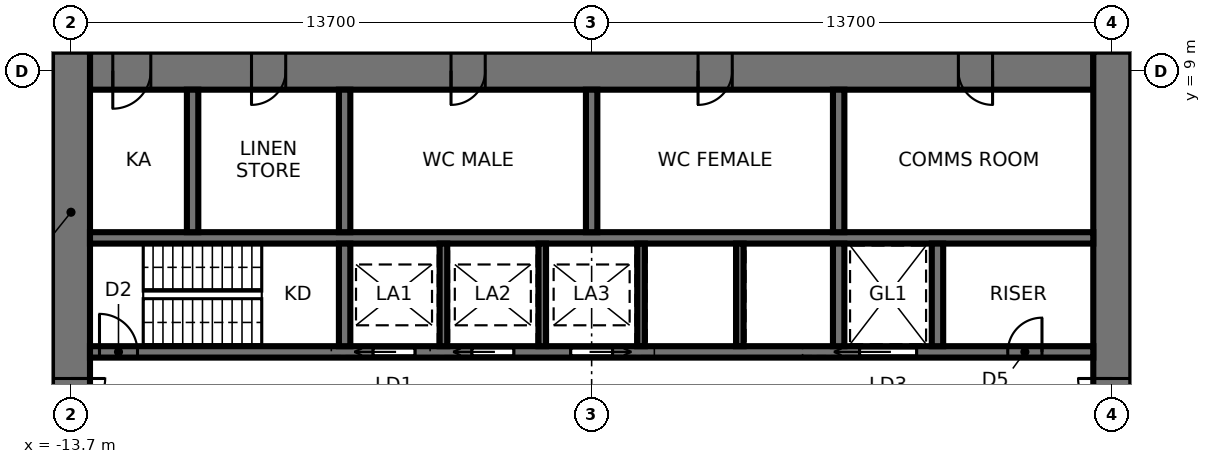
"""IFC4 building model, lengths in metres.
Left out: names, types, materials, properties, quantities, classifications, styles, units other than length and angle.
Written with IfcOpenShell. Run it as: python <this file> out.ifc"""

import sys

from ifc_helpers import new_model, si_unit, direction, frame, frame_2d, origin, place, context, subcontext, project, spatial, rectangle, extrude, element, fill, save


model = new_model("IFC4")
c1 = context("Model", 3, precision=1e-05, world=origin(), true_north=direction((0.0, 1.0)))
c2 = subcontext(c1, "Body", "Model", "MODEL_VIEW")
j1 = project(units=[si_unit("LENGTHUNIT", "METRE"), si_unit("PLANEANGLEUNIT", "RADIAN")], contexts=[c1])
p1 = place(None, origin())
s1 = spatial("IfcSite", under=j1, at=p1, CompositionType="ELEMENT")
p2 = place(p1, origin())
s2 = spatial("IfcBuilding", under=s1, at=p2, CompositionType="ELEMENT")
p3 = place(p2, frame((0.0, 0.0, 15.1)))
s3 = spatial("IfcBuildingStorey", under=s2, at=p3, CompositionType="ELEMENT", Elevation=15.1)
p4 = place(p3, frame((13.2, 9.0, 0.0), z_axis=(0.0, 0.0, 1.0), x_axis=(-1.0, 0.0, 0.0)))
e1 = element("IfcWall", 1, at=p4, inside=s3, PredefinedType="SHEAR", context=c2, shape_type="SweptSolid", body=[
    extrude(rectangle(XDim=26.4, YDim=1.0, at=frame_2d((13.2, 0.0))), origin(), (0.0, 0.0, 1.0), 4.5),
])
p5 = place(p4, frame((2.65, 0.0, 0.0)))
e2 = element("IfcOpeningElement", 2, at=p5, cuts=e1, PredefinedType="OPENING", context=c2, shape_type="SweptSolid", body=[
    extrude(rectangle(XDim=0.9, YDim=2.1, at=frame_2d((0.45, 1.05))), frame((0.0, 0.51, 0.0), z_axis=(0.0, -1.0, 0.0), x_axis=(1.0, 0.0, 0.0)), (0.0, 0.0, 1.0), 1.02),
])
p6 = place(p4, frame((9.5, 0.0, 0.0)))
e3 = element("IfcOpeningElement", 3, at=p6, cuts=e1, PredefinedType="OPENING", context=c2, shape_type="SweptSolid", body=[
    extrude(rectangle(XDim=0.9, YDim=2.1, at=frame_2d((0.45, 1.05))), frame((0.0, 0.51, 0.0), z_axis=(0.0, -1.0, 0.0), x_axis=(1.0, 0.0, 0.0)), (0.0, 0.0, 1.0), 1.02),
])
p7 = place(p4, frame((16.0, 0.0, 0.0)))
e4 = element("IfcOpeningElement", 4, at=p7, cuts=e1, PredefinedType="OPENING", context=c2, shape_type="SweptSolid", body=[
    extrude(rectangle(XDim=0.9, YDim=2.1, at=frame_2d((0.45, 1.05))), frame((0.0, 0.51, 0.0), z_axis=(0.0, -1.0, 0.0), x_axis=(1.0, 0.0, 0.0)), (0.0, 0.0, 1.0), 1.02),
])
p8 = place(p4, frame((21.25, 0.0, 0.0)))
e5 = element("IfcOpeningElement", 5, at=p8, cuts=e1, PredefinedType="OPENING", context=c2, shape_type="SweptSolid", body=[
    extrude(rectangle(XDim=0.9, YDim=2.1, at=frame_2d((0.45, 1.05))), frame((0.0, 0.51, 0.0), z_axis=(0.0, -1.0, 0.0), x_axis=(1.0, 0.0, 0.0)), (0.0, 0.0, 1.0), 1.02),
])
p9 = place(p4, frame((24.8, 0.0, 0.0)))
e6 = element("IfcOpeningElement", 6, at=p9, cuts=e1, PredefinedType="OPENING", context=c2, shape_type="SweptSolid", body=[
    extrude(rectangle(XDim=1.0, YDim=2.1, at=frame_2d((0.5, 1.05))), frame((0.0, 0.51, 0.0), z_axis=(0.0, -1.0, 0.0), x_axis=(1.0, 0.0, 0.0)), (0.0, 0.0, 1.0), 1.02),
])
p10 = place(p3, frame((13.7, -9.5, 0.0), z_axis=(0.0, 0.0, 1.0), x_axis=(0.0, 1.0, 0.0)))
e7 = element("IfcWall", 7, at=p10, inside=s3, PredefinedType="SHEAR", context=c2, shape_type="SweptSolid", body=[
    extrude(rectangle(XDim=19.0, YDim=1.0, at=frame_2d((9.5, 0.0))), origin(), (0.0, 0.0, 1.0), 4.5),
])
p11 = place(p10, frame((8.6, 0.0, 0.0)))
e8 = element("IfcOpeningElement", 8, at=p11, cuts=e7, PredefinedType="OPENING", context=c2, shape_type="SweptSolid", body=[
    extrude(rectangle(XDim=1.8, YDim=2.4, at=frame_2d((0.9, 1.2))), frame((0.0, 0.51, 0.0), z_axis=(0.0, -1.0, 0.0), x_axis=(1.0, 0.0, 0.0)), (0.0, 0.0, 1.0), 1.02),
])
p12 = place(p3, frame((-13.7, 9.5, 0.0), z_axis=(0.0, 0.0, 1.0), x_axis=(0.0, -1.0, 0.0)))
e9 = element("IfcWall", 9, at=p12, inside=s3, PredefinedType="SHEAR", context=c2, shape_type="SweptSolid", body=[
    extrude(rectangle(XDim=19.0, YDim=1.0, at=frame_2d((9.5, 0.0))), origin(), (0.0, 0.0, 1.0), 4.5),
])
p13 = place(p12, frame((8.6, 0.0, 0.0)))
e10 = element("IfcOpeningElement", 10, at=p13, cuts=e9, PredefinedType="OPENING", context=c2, shape_type="SweptSolid", body=[
    extrude(rectangle(XDim=1.8, YDim=2.4, at=frame_2d((0.9, 1.2))), frame((0.0, 0.51, 0.0), z_axis=(0.0, -1.0, 0.0), x_axis=(1.0, 0.0, 0.0)), (0.0, 0.0, 1.0), 1.02),
])
p14 = place(p3, frame((-13.2, 1.6, 0.0), z_axis=(0.0, 0.0, 1.0), x_axis=(1.0, 0.0, 0.0)))
e11 = element("IfcWall", 11, at=p14, inside=s3, PredefinedType="SHEAR", context=c2, shape_type="SweptSolid", body=[
    extrude(rectangle(XDim=26.4, YDim=0.3, at=frame_2d((13.2, 0.0))), origin(), (0.0, 0.0, 1.0), 4.5),
])
p15 = place(p14, frame((0.25, 0.0, 0.0)))
e12 = element("IfcOpeningElement", 12, at=p15, cuts=e11, PredefinedType="OPENING", context=c2, shape_type="SweptSolid", body=[
    extrude(rectangle(XDim=1.0, YDim=2.1, at=frame_2d((0.5, 1.05))), frame((0.0, 0.16, 0.0), z_axis=(0.0, -1.0, 0.0), x_axis=(1.0, 0.0, 0.0)), (0.0, 0.0, 1.0), 0.32),
])
p16 = place(p14, frame((20.25, 0.0, 0.0)))
e13 = element("IfcOpeningElement", 13, at=p16, cuts=e11, PredefinedType="OPENING", context=c2, shape_type="SweptSolid", body=[
    extrude(rectangle(XDim=1.5, YDim=2.4, at=frame_2d((0.75, 1.2))), frame((0.0, 0.16, 0.0), z_axis=(0.0, -1.0, 0.0), x_axis=(1.0, 0.0, 0.0)), (0.0, 0.0, 1.0), 0.32),
])
p17 = place(p14, frame((7.45, 0.0, 0.0)))
e14 = element("IfcOpeningElement", 14, at=p17, cuts=e11, PredefinedType="OPENING", context=c2, shape_type="SweptSolid", body=[
    extrude(rectangle(XDim=1.1, YDim=2.3, at=frame_2d((0.55, 1.15))), frame((0.0, 0.16, 0.0), z_axis=(0.0, -1.0, 0.0), x_axis=(1.0, 0.0, 0.0)), (0.0, 0.0, 1.0), 0.32),
])
p18 = place(p14, frame((10.05, 0.0, 0.0)))
e15 = element("IfcOpeningElement", 15, at=p18, cuts=e11, PredefinedType="OPENING", context=c2, shape_type="SweptSolid", body=[
    extrude(rectangle(XDim=1.1, YDim=2.3, at=frame_2d((0.55, 1.15))), frame((0.0, 0.16, 0.0), z_axis=(0.0, -1.0, 0.0), x_axis=(1.0, 0.0, 0.0)), (0.0, 0.0, 1.0), 0.32),
])
p19 = place(p14, frame((12.65, 0.0, 0.0)))
e16 = element("IfcOpeningElement", 16, at=p19, cuts=e11, PredefinedType="OPENING", context=c2, shape_type="SweptSolid", body=[
    extrude(rectangle(XDim=1.1, YDim=2.3, at=frame_2d((0.55, 1.15))), frame((0.0, 0.16, 0.0), z_axis=(0.0, -1.0, 0.0), x_axis=(1.0, 0.0, 0.0)), (0.0, 0.0, 1.0), 0.32),
])
p20 = place(p14, frame((24.15, 0.0, 0.0)))
e17 = element("IfcOpeningElement", 17, at=p20, cuts=e11, PredefinedType="OPENING", context=c2, shape_type="SweptSolid", body=[
    extrude(rectangle(XDim=0.9, YDim=2.1, at=frame_2d((0.45, 1.05))), frame((0.0, 0.16, 0.0), z_axis=(0.0, -1.0, 0.0), x_axis=(1.0, 0.0, 0.0)), (0.0, 0.0, 1.0), 0.32),
])
p21 = place(p3, frame((-13.2, 4.6, 0.0), z_axis=(0.0, 0.0, 1.0), x_axis=(1.0, 0.0, 0.0)))
e18 = element("IfcWall", 18, at=p21, inside=s3, PredefinedType="SHEAR", context=c2, shape_type="SweptSolid", body=[
    extrude(rectangle(XDim=26.4, YDim=0.3, at=frame_2d((13.2, 0.0))), origin(), (0.0, 0.0, 1.0), 4.5),
])
p22 = place(p3, frame((-6.5, 1.75, 0.0), z_axis=(0.0, 0.0, 1.0), x_axis=(0.0, 1.0, 0.0)))
e19 = element("IfcWall", 19, at=p22, inside=s3, PredefinedType="SHEAR", context=c2, shape_type="SweptSolid", body=[
    extrude(rectangle(XDim=2.7, YDim=0.3, at=frame_2d((1.35, 0.0))), origin(), (0.0, 0.0, 1.0), 4.5),
])
p23 = place(p3, frame((-6.5, 4.75, 0.0), z_axis=(0.0, 0.0, 1.0), x_axis=(0.0, 1.0, 0.0)))
e20 = element("IfcWall", 20, at=p23, inside=s3, PredefinedType="SHEAR", context=c2, shape_type="SweptSolid", body=[
    extrude(rectangle(XDim=3.75, YDim=0.3, at=frame_2d((1.875, 0.0))), origin(), (0.0, 0.0, 1.0), 4.5),
])
p24 = place(p3, frame((6.5, 1.75, 0.0), z_axis=(0.0, 0.0, 1.0), x_axis=(0.0, 1.0, 0.0)))
e21 = element("IfcWall", 21, at=p24, inside=s3, PredefinedType="SHEAR", context=c2, shape_type="SweptSolid", body=[
    extrude(rectangle(XDim=2.7, YDim=0.3, at=frame_2d((1.35, 0.0))), origin(), (0.0, 0.0, 1.0), 4.5),
])
p25 = place(p3, frame((6.5, 4.75, 0.0), z_axis=(0.0, 0.0, 1.0), x_axis=(0.0, 1.0, 0.0)))
e22 = element("IfcWall", 22, at=p25, inside=s3, PredefinedType="SHEAR", context=c2, shape_type="SweptSolid", body=[
    extrude(rectangle(XDim=3.75, YDim=0.3, at=frame_2d((1.875, 0.0))), origin(), (0.0, 0.0, 1.0), 4.5),
])
for number, where, z_axis, x_axis in (
    (23, (-3.9, 1.75, 0.0), (0.0, 0.0, 1.0), (0.0, 1.0, 0.0)),
    (24, (-1.3, 1.75, 0.0), (0.0, 0.0, 1.0), (0.0, 1.0, 0.0)),
    (25, (1.3, 1.75, 0.0), (0.0, 0.0, 1.0), (0.0, 1.0, 0.0)),
    (26, (3.9, 1.75, 0.0), (0.0, 0.0, 1.0), (0.0, 1.0, 0.0)),
):
    element("IfcWall", number, at=place(p3, frame(where, z_axis=z_axis, x_axis=x_axis)), inside=s3, PredefinedType="SHEAR", context=c2, shape_type="SweptSolid", body=[
        extrude(rectangle(XDim=2.7, YDim=0.2, at=frame_2d((1.35, 0.0))), origin(), (0.0, 0.0, 1.0), 4.5),
    ])
for number, where, z_axis, x_axis in (
    (27, (0.0, 4.75, 0.0), (0.0, 0.0, 1.0), (0.0, 1.0, 0.0)),
    (28, (-10.5, 4.75, 0.0), (0.0, 0.0, 1.0), (0.0, 1.0, 0.0)),
):
    element("IfcWall", number, at=place(p3, frame(where, z_axis=z_axis, x_axis=x_axis)), inside=s3, PredefinedType="SHEAR", context=c2, shape_type="SweptSolid", body=[
        extrude(rectangle(XDim=3.75, YDim=0.3, at=frame_2d((1.875, 0.0))), origin(), (0.0, 0.0, 1.0), 4.5),
    ])
p26 = place(p3, frame((9.1, 1.75, 0.0), z_axis=(0.0, 0.0, 1.0), x_axis=(0.0, 1.0, 0.0)))
e29 = element("IfcWall", 29, at=p26, inside=s3, PredefinedType="SHEAR", context=c2, shape_type="SweptSolid", body=[
    extrude(rectangle(XDim=2.7, YDim=0.3, at=frame_2d((1.35, 0.0))), origin(), (0.0, 0.0, 1.0), 4.5),
])
p27 = place(p13, origin())
e30 = element("IfcDoor", 30, at=p27, inside=s3, OperationType="DOUBLE_DOOR_SINGLE_SWING", PredefinedType="DOOR", context=c2, shape_type="SweptSolid", body=[
    extrude(rectangle(XDim=1.72, YDim=2.36, at=frame_2d((0.9, 1.18))), frame((0.0, 0.025, 0.0), z_axis=(0.0, -1.0, 0.0), x_axis=(1.0, 0.0, 0.0)), (0.0, 0.0, 1.0), 0.05),
    extrude(rectangle(XDim=0.04, YDim=2.4, at=frame_2d((0.02, 1.2))), frame((0.0, 0.25, 0.0), z_axis=(0.0, -1.0, 0.0), x_axis=(1.0, 0.0, 0.0)), (0.0, 0.0, 1.0), 0.5),
    extrude(rectangle(XDim=0.04, YDim=2.4, at=frame_2d((1.78, 1.2))), frame((0.0, 0.25, 0.0), z_axis=(0.0, -1.0, 0.0), x_axis=(1.0, 0.0, 0.0)), (0.0, 0.0, 1.0), 0.5),
    extrude(rectangle(XDim=1.72, YDim=0.04, at=frame_2d((0.9, 2.38))), frame((0.0, 0.25, 0.0), z_axis=(0.0, -1.0, 0.0), x_axis=(1.0, 0.0, 0.0)), (0.0, 0.0, 1.0), 0.5),
])
fill(e10, e30)
p28 = place(p11, origin())
e31 = element("IfcDoor", 31, at=p28, inside=s3, OperationType="DOUBLE_DOOR_SINGLE_SWING", PredefinedType="DOOR", context=c2, shape_type="SweptSolid", body=[
    extrude(rectangle(XDim=1.72, YDim=2.36, at=frame_2d((0.9, 1.18))), frame((0.0, 0.025, 0.0), z_axis=(0.0, -1.0, 0.0), x_axis=(1.0, 0.0, 0.0)), (0.0, 0.0, 1.0), 0.05),
    extrude(rectangle(XDim=0.04, YDim=2.4, at=frame_2d((0.02, 1.2))), frame((0.0, 0.25, 0.0), z_axis=(0.0, -1.0, 0.0), x_axis=(1.0, 0.0, 0.0)), (0.0, 0.0, 1.0), 0.5),
    extrude(rectangle(XDim=0.04, YDim=2.4, at=frame_2d((1.78, 1.2))), frame((0.0, 0.25, 0.0), z_axis=(0.0, -1.0, 0.0), x_axis=(1.0, 0.0, 0.0)), (0.0, 0.0, 1.0), 0.5),
    extrude(rectangle(XDim=1.72, YDim=0.04, at=frame_2d((0.9, 2.38))), frame((0.0, 0.25, 0.0), z_axis=(0.0, -1.0, 0.0), x_axis=(1.0, 0.0, 0.0)), (0.0, 0.0, 1.0), 0.5),
])
fill(e8, e31)
p29 = place(p15, origin())
e32 = element("IfcDoor", 32, at=p29, inside=s3, OperationType="SINGLE_SWING_LEFT", PredefinedType="DOOR", context=c2, shape_type="SweptSolid", body=[
    extrude(rectangle(XDim=1.0, YDim=2.1, at=frame_2d((0.5, 1.05))), frame((0.0, 0.025, 0.0), z_axis=(0.0, -1.0, 0.0), x_axis=(1.0, 0.0, 0.0)), (0.0, 0.0, 1.0), 0.05),
])
fill(e12, e32)
p30 = place(p16, origin())
e33 = element("IfcDoor", 33, at=p30, inside=s3, OperationType="SLIDING_TO_LEFT", PredefinedType="DOOR", context=c2, shape_type="SweptSolid", body=[
    extrude(rectangle(XDim=1.5, YDim=2.4, at=frame_2d((0.75, 1.2))), frame((0.0, 0.025, 0.0), z_axis=(0.0, -1.0, 0.0), x_axis=(1.0, 0.0, 0.0)), (0.0, 0.0, 1.0), 0.05),
])
fill(e13, e33)
p31 = place(p17, origin())
e34 = element("IfcDoor", 34, at=p31, inside=s3, OperationType="SLIDING_TO_LEFT", PredefinedType="DOOR", context=c2, shape_type="SweptSolid", body=[
    extrude(rectangle(XDim=1.1, YDim=2.3, at=frame_2d((0.55, 1.15))), frame((0.0, 0.025, 0.0), z_axis=(0.0, -1.0, 0.0), x_axis=(1.0, 0.0, 0.0)), (0.0, 0.0, 1.0), 0.05),
])
fill(e14, e34)
p32 = place(p18, origin())
e35 = element("IfcDoor", 35, at=p32, inside=s3, OperationType="SLIDING_TO_LEFT", PredefinedType="DOOR", context=c2, shape_type="SweptSolid", body=[
    extrude(rectangle(XDim=1.1, YDim=2.3, at=frame_2d((0.55, 1.15))), frame((0.0, 0.025, 0.0), z_axis=(0.0, -1.0, 0.0), x_axis=(1.0, 0.0, 0.0)), (0.0, 0.0, 1.0), 0.05),
])
fill(e15, e35)
p33 = place(p19, origin())
e36 = element("IfcDoor", 36, at=p33, inside=s3, OperationType="SLIDING_TO_RIGHT", PredefinedType="DOOR", context=c2, shape_type="SweptSolid", body=[
    extrude(rectangle(XDim=1.1, YDim=2.3, at=frame_2d((0.55, 1.15))), frame((0.0, 0.025, 0.0), z_axis=(0.0, -1.0, 0.0), x_axis=(1.0, 0.0, 0.0)), (0.0, 0.0, 1.0), 0.05),
])
fill(e16, e36)
p34 = place(p20, origin())
e37 = element("IfcDoor", 37, at=p34, inside=s3, OperationType="SINGLE_SWING_RIGHT", PredefinedType="DOOR", context=c2, shape_type="SweptSolid", body=[
    extrude(rectangle(XDim=0.9, YDim=2.1, at=frame_2d((0.45, 1.05))), frame((0.0, 0.025, 0.0), z_axis=(0.0, -1.0, 0.0), x_axis=(1.0, 0.0, 0.0)), (0.0, 0.0, 1.0), 0.05),
])
fill(e17, e37)
p35 = place(p5, origin())
e38 = element("IfcDoor", 38, at=p35, inside=s3, OperationType="SINGLE_SWING_LEFT", PredefinedType="DOOR", context=c2, shape_type="SweptSolid", body=[
    extrude(rectangle(XDim=0.82, YDim=2.06, at=frame_2d((0.45, 1.03))), frame((0.0, 0.025, 0.0), z_axis=(0.0, -1.0, 0.0), x_axis=(1.0, 0.0, 0.0)), (0.0, 0.0, 1.0), 0.05),
    extrude(rectangle(XDim=0.04, YDim=2.1, at=frame_2d((0.02, 1.05))), frame((0.0, 0.25, 0.0), z_axis=(0.0, -1.0, 0.0), x_axis=(1.0, 0.0, 0.0)), (0.0, 0.0, 1.0), 0.5),
    extrude(rectangle(XDim=0.04, YDim=2.1, at=frame_2d((0.88, 1.05))), frame((0.0, 0.25, 0.0), z_axis=(0.0, -1.0, 0.0), x_axis=(1.0, 0.0, 0.0)), (0.0, 0.0, 1.0), 0.5),
    extrude(rectangle(XDim=0.82, YDim=0.04, at=frame_2d((0.45, 2.08))), frame((0.0, 0.25, 0.0), z_axis=(0.0, -1.0, 0.0), x_axis=(1.0, 0.0, 0.0)), (0.0, 0.0, 1.0), 0.5),
])
fill(e2, e38)
p36 = place(p6, origin())
e39 = element("IfcDoor", 39, at=p36, inside=s3, OperationType="SINGLE_SWING_RIGHT", PredefinedType="DOOR", context=c2, shape_type="SweptSolid", body=[
    extrude(rectangle(XDim=0.82, YDim=2.06, at=frame_2d((0.45, 1.03))), frame((0.0, 0.025, 0.0), z_axis=(0.0, -1.0, 0.0), x_axis=(1.0, 0.0, 0.0)), (0.0, 0.0, 1.0), 0.05),
    extrude(rectangle(XDim=0.04, YDim=2.1, at=frame_2d((0.02, 1.05))), frame((0.0, 0.25, 0.0), z_axis=(0.0, -1.0, 0.0), x_axis=(1.0, 0.0, 0.0)), (0.0, 0.0, 1.0), 0.5),
    extrude(rectangle(XDim=0.04, YDim=2.1, at=frame_2d((0.88, 1.05))), frame((0.0, 0.25, 0.0), z_axis=(0.0, -1.0, 0.0), x_axis=(1.0, 0.0, 0.0)), (0.0, 0.0, 1.0), 0.5),
    extrude(rectangle(XDim=0.82, YDim=0.04, at=frame_2d((0.45, 2.08))), frame((0.0, 0.25, 0.0), z_axis=(0.0, -1.0, 0.0), x_axis=(1.0, 0.0, 0.0)), (0.0, 0.0, 1.0), 0.5),
])
fill(e3, e39)
p37 = place(p7, origin())
e40 = element("IfcDoor", 40, at=p37, inside=s3, OperationType="SINGLE_SWING_RIGHT", PredefinedType="DOOR", context=c2, shape_type="SweptSolid", body=[
    extrude(rectangle(XDim=0.82, YDim=2.06, at=frame_2d((0.45, 1.03))), frame((0.0, 0.025, 0.0), z_axis=(0.0, -1.0, 0.0), x_axis=(1.0, 0.0, 0.0)), (0.0, 0.0, 1.0), 0.05),
    extrude(rectangle(XDim=0.04, YDim=2.1, at=frame_2d((0.02, 1.05))), frame((0.0, 0.25, 0.0), z_axis=(0.0, -1.0, 0.0), x_axis=(1.0, 0.0, 0.0)), (0.0, 0.0, 1.0), 0.5),
    extrude(rectangle(XDim=0.04, YDim=2.1, at=frame_2d((0.88, 1.05))), frame((0.0, 0.25, 0.0), z_axis=(0.0, -1.0, 0.0), x_axis=(1.0, 0.0, 0.0)), (0.0, 0.0, 1.0), 0.5),
    extrude(rectangle(XDim=0.82, YDim=0.04, at=frame_2d((0.45, 2.08))), frame((0.0, 0.25, 0.0), z_axis=(0.0, -1.0, 0.0), x_axis=(1.0, 0.0, 0.0)), (0.0, 0.0, 1.0), 0.5),
])
fill(e4, e40)
p38 = place(p8, origin())
e41 = element("IfcDoor", 41, at=p38, inside=s3, OperationType="SINGLE_SWING_RIGHT", PredefinedType="DOOR", context=c2, shape_type="SweptSolid", body=[
    extrude(rectangle(XDim=0.82, YDim=2.06, at=frame_2d((0.45, 1.03))), frame((0.0, 0.025, 0.0), z_axis=(0.0, -1.0, 0.0), x_axis=(1.0, 0.0, 0.0)), (0.0, 0.0, 1.0), 0.05),
    extrude(rectangle(XDim=0.04, YDim=2.1, at=frame_2d((0.02, 1.05))), frame((0.0, 0.25, 0.0), z_axis=(0.0, -1.0, 0.0), x_axis=(1.0, 0.0, 0.0)), (0.0, 0.0, 1.0), 0.5),
    extrude(rectangle(XDim=0.04, YDim=2.1, at=frame_2d((0.88, 1.05))), frame((0.0, 0.25, 0.0), z_axis=(0.0, -1.0, 0.0), x_axis=(1.0, 0.0, 0.0)), (0.0, 0.0, 1.0), 0.5),
    extrude(rectangle(XDim=0.82, YDim=0.04, at=frame_2d((0.45, 2.08))), frame((0.0, 0.25, 0.0), z_axis=(0.0, -1.0, 0.0), x_axis=(1.0, 0.0, 0.0)), (0.0, 0.0, 1.0), 0.5),
])
fill(e5, e41)
p39 = place(p9, origin())
e42 = element("IfcDoor", 42, at=p39, inside=s3, OperationType="SINGLE_SWING_RIGHT", PredefinedType="DOOR", context=c2, shape_type="SweptSolid", body=[
    extrude(rectangle(XDim=0.92, YDim=2.06, at=frame_2d((0.5, 1.03))), frame((0.0, 0.025, 0.0), z_axis=(0.0, -1.0, 0.0), x_axis=(1.0, 0.0, 0.0)), (0.0, 0.0, 1.0), 0.05),
    extrude(rectangle(XDim=0.04, YDim=2.1, at=frame_2d((0.02, 1.05))), frame((0.0, 0.25, 0.0), z_axis=(0.0, -1.0, 0.0), x_axis=(1.0, 0.0, 0.0)), (0.0, 0.0, 1.0), 0.5),
    extrude(rectangle(XDim=0.04, YDim=2.1, at=frame_2d((0.98, 1.05))), frame((0.0, 0.25, 0.0), z_axis=(0.0, -1.0, 0.0), x_axis=(1.0, 0.0, 0.0)), (0.0, 0.0, 1.0), 0.5),
    extrude(rectangle(XDim=0.92, YDim=0.04, at=frame_2d((0.5, 2.08))), frame((0.0, 0.25, 0.0), z_axis=(0.0, -1.0, 0.0), x_axis=(1.0, 0.0, 0.0)), (0.0, 0.0, 1.0), 0.5),
])
fill(e6, e42)
save(model, sys.argv[1])
